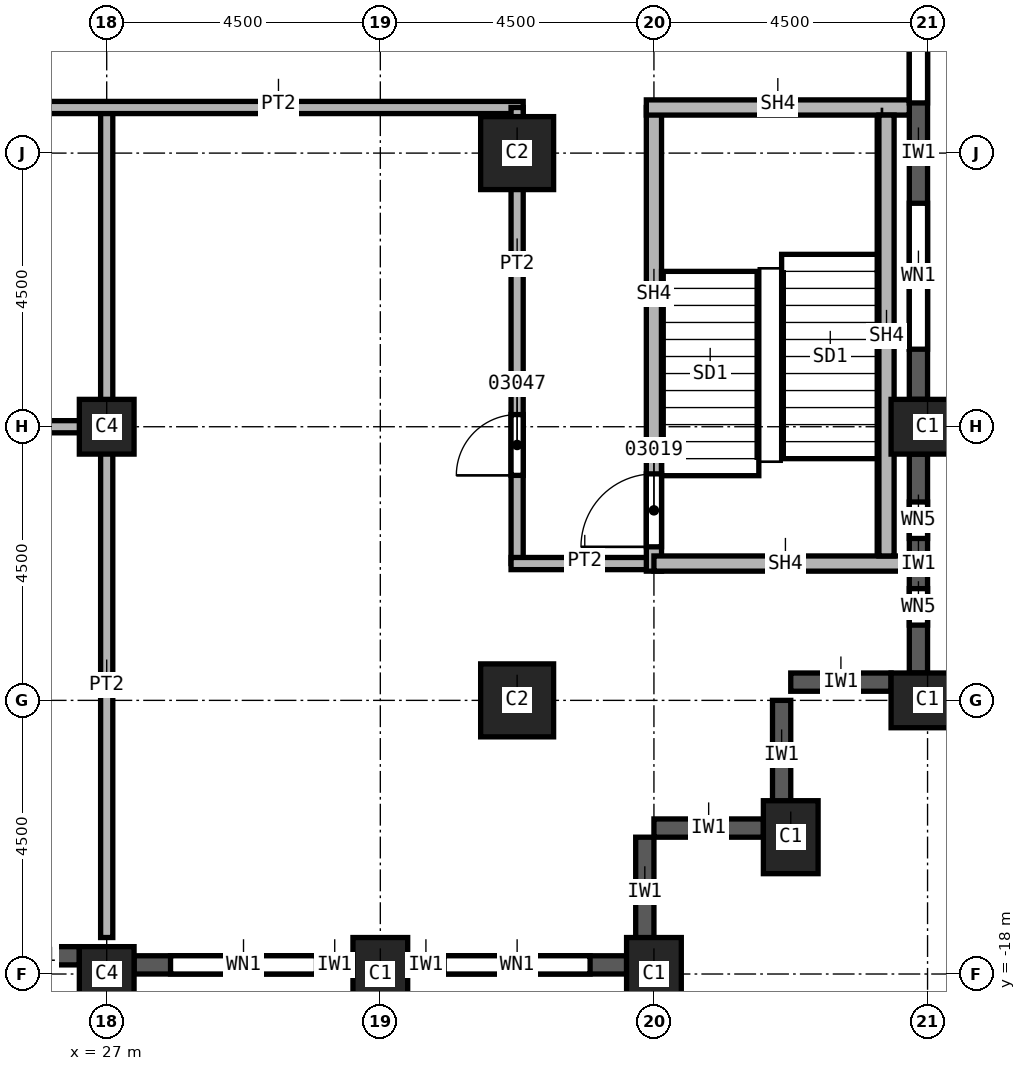
"""IFC4 building model, lengths in metres.
Left out: names, types, materials, properties, quantities, classifications, styles, units other than length and angle.
Written with IfcOpenShell. Run it as: python <this file> out.ifc"""

import sys

from ifc_helpers import new_model, si_unit, direction, frame, frame_2d, origin, origin_2d, place, context, subcontext, project, spatial, rectangle, extrude, element, fill, save


model = new_model("IFC4")
c1 = context("Model", 3, precision=1e-05, world=origin(), true_north=direction((0.0, 1.0)))
c2 = subcontext(c1, "Body", "Model", "MODEL_VIEW")
j1 = project(units=[si_unit("LENGTHUNIT", "METRE"), si_unit("PLANEANGLEUNIT", "RADIAN")], contexts=[c1])
p1 = place(None, origin())
s1 = spatial("IfcSite", under=j1, at=p1, CompositionType="ELEMENT")
p2 = place(p1, origin())
s2 = spatial("IfcBuilding", under=s1, at=p2, CompositionType="ELEMENT")
p3 = place(p2, frame((0.0, 0.0, 92.0)))
s3 = spatial("IfcBuildingStorey", under=s2, at=p3, CompositionType="ELEMENT", Elevation=92.0)
for number, where, z_axis, x_axis in (
    (1, (40.5, -9.0, 0.0), (0.0, 0.0, 1.0), (0.0, 1.0, 0.0)),
    (2, (40.5, -13.5, 0.0), (0.0, 0.0, 1.0), (0.0, 1.0, 0.0)),
    (3, (38.25, -15.75, 0.0), (0.0, 0.0, 1.0), (1.0, 0.0, 0.0)),
    (4, (31.5, -18.0, 0.0), (0.0, 0.0, 1.0), (1.0, 0.0, 0.0)),
    (5, (36.0, -18.0, 0.0), (0.0, 0.0, 1.0), (1.0, 0.0, 0.0)),
):
    element("IfcColumn", number, at=place(p3, frame(where, z_axis=z_axis, x_axis=x_axis)), inside=s3, PredefinedType="COLUMN", context=c2, shape_type="SweptSolid", body=[
        extrude(rectangle(XDim=0.9, YDim=1.2, at=origin_2d()), origin(), (0.0, 0.0, 1.0), 3.7),
    ])
for number, where, z_axis, x_axis in (
    (6, (33.75, -4.5, 0.0), (0.0, 0.0, 1.0), (1.0, 0.0, 0.0)),
    (7, (33.75, -13.5, 0.0), (0.0, 0.0, 1.0), (1.0, 0.0, 0.0)),
):
    element("IfcColumn", number, at=place(p3, frame(where, z_axis=z_axis, x_axis=x_axis)), inside=s3, PredefinedType="COLUMN", context=c2, shape_type="SweptSolid", body=[
        extrude(rectangle(XDim=1.2, YDim=1.2, at=origin_2d()), origin(), (0.0, 0.0, 1.0), 3.7),
    ])
for number, where, z_axis, x_axis in (
    (8, (27.0, -9.0, 0.0), (0.0, 0.0, 1.0), (1.0, 0.0, 0.0)),
    (9, (27.0, -18.0, 0.0), (0.0, 0.0, 1.0), (1.0, 0.0, 0.0)),
):
    element("IfcColumn", number, at=place(p3, frame(where, z_axis=z_axis, x_axis=x_axis)), inside=s3, PredefinedType="COLUMN", context=c2, shape_type="SweptSolid", body=[
        extrude(rectangle(XDim=0.9, YDim=0.9, at=origin_2d()), origin(), (0.0, 0.0, 1.0), 3.7),
    ])
for number, where, z_axis, x_axis in (
    (10, (35.85, -17.55, 0.0), (0.0, 0.0, 1.0), (0.0, 1.0, 0.0)),
    (11, (37.8, -15.6, 0.0), (0.0, 0.0, 1.0), (-1.0, 0.0, 0.0)),
    (12, (38.1, -15.3, 0.0), (0.0, 0.0, 1.0), (0.0, 1.0, 0.0)),
):
    element("IfcWall", number, at=place(p3, frame(where, z_axis=z_axis, x_axis=x_axis)), inside=s3, PredefinedType="SOLIDWALL", context=c2, shape_type="SweptSolid", body=[
        extrude(rectangle(XDim=1.8, YDim=0.3, at=frame_2d((0.9, 0.0))), origin(), (0.0, 0.0, 1.0), 3.1),
    ])
p4 = place(p3, frame((39.9, -13.2, 0.0), z_axis=(0.0, 0.0, 1.0), x_axis=(-1.0, 0.0, 0.0)))
e13 = element("IfcWall", 13, at=p4, inside=s3, PredefinedType="SOLIDWALL", context=c2, shape_type="SweptSolid", body=[
    extrude(rectangle(XDim=1.65, YDim=0.3, at=frame_2d((0.825, 0.0))), origin(), (0.0, 0.0, 1.0), 3.1),
])
p5 = place(p3, frame((25.2, -17.7, 0.0), z_axis=(0.0, 0.0, 1.0), x_axis=(1.0, 0.0, 0.0)))
e14 = element("IfcWall", 14, at=p5, inside=s3, PredefinedType="SOLIDWALL", context=c2, shape_type="SweptSolid", body=[
    extrude(rectangle(XDim=1.35, YDim=0.3, at=frame_2d((0.675, 0.0))), origin(), (0.0, 0.0, 1.0), 3.1),
])
p6 = place(p3, frame((27.45, -17.85, 0.0), z_axis=(0.0, 0.0, 1.0), x_axis=(1.0, 0.0, 0.0)))
e15 = element("IfcWall", 15, at=p6, inside=s3, PredefinedType="SOLIDWALL", context=c2, shape_type="SweptSolid", body=[
    extrude(rectangle(XDim=3.6, YDim=0.3, at=frame_2d((1.8, 0.0))), origin(), (0.0, 0.0, 1.0), 3.1),
])
p7 = place(p6, frame((0.6, 0.0, 0.8)))
e16 = element("IfcOpeningElement", 16, at=p7, cuts=e15, PredefinedType="OPENING", context=c2, shape_type="SweptSolid", body=[
    extrude(rectangle(XDim=2.4, YDim=1.95, at=frame_2d((1.2, 0.975))), frame((0.0, 0.15, 0.0), z_axis=(0.0, -1.0, 0.0), x_axis=(1.0, 0.0, 0.0)), (0.0, 0.0, 1.0), 0.3),
])
p8 = place(p3, frame((31.95, -17.85, 0.0), z_axis=(0.0, 0.0, 1.0), x_axis=(1.0, 0.0, 0.0)))
e17 = element("IfcWall", 17, at=p8, inside=s3, PredefinedType="SOLIDWALL", context=c2, shape_type="SweptSolid", body=[
    extrude(rectangle(XDim=3.6, YDim=0.3, at=frame_2d((1.8, 0.0))), origin(), (0.0, 0.0, 1.0), 3.1),
])
p9 = place(p8, frame((0.6, 0.0, 0.8)))
e18 = element("IfcOpeningElement", 18, at=p9, cuts=e17, PredefinedType="OPENING", context=c2, shape_type="SweptSolid", body=[
    extrude(rectangle(XDim=2.4, YDim=1.95, at=frame_2d((1.2, 0.975))), frame((0.0, 0.15, 0.0), z_axis=(0.0, -1.0, 0.0), x_axis=(1.0, 0.0, 0.0)), (0.0, 0.0, 1.0), 0.3),
])
p10 = place(p3, frame((40.35, -13.05, 0.0), z_axis=(0.0, 0.0, 1.0), x_axis=(0.0, 1.0, 0.0)))
e19 = element("IfcWall", 19, at=p10, inside=s3, PredefinedType="SOLIDWALL", context=c2, shape_type="SweptSolid", body=[
    extrude(rectangle(XDim=3.6, YDim=0.3, at=frame_2d((1.8, 0.0))), origin(), (0.0, 0.0, 1.0), 3.1),
])
p11 = place(p10, frame((0.788, 0.0, 0.8)))
e20 = element("IfcOpeningElement", 20, at=p11, cuts=e19, PredefinedType="OPENING", context=c2, shape_type="SweptSolid", body=[
    extrude(rectangle(XDim=0.6, YDim=1.95, at=frame_2d((0.3, 0.975))), frame((0.0, 0.15, 0.0), z_axis=(0.0, -1.0, 0.0), x_axis=(1.0, 0.0, 0.0)), (0.0, 0.0, 1.0), 0.3),
])
p12 = place(p10, frame((2.212, 0.0, 0.8)))
e21 = element("IfcOpeningElement", 21, at=p12, cuts=e19, PredefinedType="OPENING", context=c2, shape_type="SweptSolid", body=[
    extrude(rectangle(XDim=0.6, YDim=1.95, at=frame_2d((0.3, 0.975))), frame((0.0, 0.15, 0.0), z_axis=(0.0, -1.0, 0.0), x_axis=(1.0, 0.0, 0.0)), (0.0, 0.0, 1.0), 0.3),
])
p13 = place(p3, frame((40.35, -8.55, 0.0), z_axis=(0.0, 0.0, 1.0), x_axis=(0.0, 1.0, 0.0)))
e22 = element("IfcWall", 22, at=p13, inside=s3, PredefinedType="SOLIDWALL", context=c2, shape_type="SweptSolid", body=[
    extrude(rectangle(XDim=8.1, YDim=0.3, at=frame_2d((4.05, 0.0))), origin(), (0.0, 0.0, 1.0), 3.1),
])
p14 = place(p13, frame((0.825, 0.0, 0.8)))
e23 = element("IfcOpeningElement", 23, at=p14, cuts=e22, PredefinedType="OPENING", context=c2, shape_type="SweptSolid", body=[
    extrude(rectangle(XDim=2.4, YDim=1.95, at=frame_2d((1.2, 0.975))), frame((0.0, 0.15, 0.0), z_axis=(0.0, -1.0, 0.0), x_axis=(1.0, 0.0, 0.0)), (0.0, 0.0, 1.0), 0.3),
])
p15 = place(p13, frame((4.875, 0.0, 0.8)))
e24 = element("IfcOpeningElement", 24, at=p15, cuts=e22, PredefinedType="OPENING", context=c2, shape_type="SweptSolid", body=[
    extrude(rectangle(XDim=2.4, YDim=1.95, at=frame_2d((1.2, 0.975))), frame((0.0, 0.15, 0.0), z_axis=(0.0, -1.0, 0.0), x_axis=(1.0, 0.0, 0.0)), (0.0, 0.0, 1.0), 0.3),
])
p16 = place(p3, frame((19.9, -9.0, 0.0), z_axis=(0.0, 0.0, 1.0), x_axis=(1.0, 0.0, 0.0)))
e25 = element("IfcWall", 25, at=p16, inside=s3, PredefinedType="PARTITIONING", context=c2, shape_type="SweptSolid", body=[
    extrude(rectangle(XDim=7.2, YDim=0.2, at=frame_2d((3.6, 0.0))), origin(), (0.0, 0.0, 1.0), 3.7),
])
p17 = place(p3, frame((27.0, -3.75, 0.0), z_axis=(0.0, 0.0, 1.0), x_axis=(0.0, -1.0, 0.0)))
e26 = element("IfcWall", 26, at=p17, inside=s3, PredefinedType="PARTITIONING", context=c2, shape_type="SweptSolid", body=[
    extrude(rectangle(XDim=13.65, YDim=0.2, at=frame_2d((6.825, 0.0))), origin(), (0.0, 0.0, 1.0), 3.7),
])
p18 = place(p3, frame((33.85, -3.75, 0.0), z_axis=(0.0, 0.0, 1.0), x_axis=(-1.0, 0.0, 0.0)))
e27 = element("IfcWall", 27, at=p18, inside=s3, PredefinedType="PARTITIONING", context=c2, shape_type="SweptSolid", body=[
    extrude(rectangle(XDim=13.95, YDim=0.2, at=frame_2d((6.975, 0.0))), origin(), (0.0, 0.0, 1.0), 3.7),
])
p19 = place(p18, frame((8.05, 0.0, 0.0)))
e28 = element("IfcOpeningElement", 28, at=p19, cuts=e27, PredefinedType="OPENING", context=c2, shape_type="SweptSolid", body=[
    extrude(rectangle(XDim=1.0, YDim=2.1, at=frame_2d((0.5, 1.05))), frame((0.0, 0.1, 0.0), z_axis=(0.0, -1.0, 0.0), x_axis=(1.0, 0.0, 0.0)), (0.0, 0.0, 1.0), 0.2),
])
p20 = place(p3, frame((33.75, -11.25, 0.0), z_axis=(0.0, 0.0, 1.0), x_axis=(0.0, 1.0, 0.0)))
e29 = element("IfcWall", 29, at=p20, inside=s3, PredefinedType="PARTITIONING", context=c2, shape_type="SweptSolid", body=[
    extrude(rectangle(XDim=7.5, YDim=0.2, at=frame_2d((3.75, 0.0))), origin(), (0.0, 0.0, 1.0), 3.7),
])
p21 = place(p20, frame((1.45, 0.0, 0.0)))
e30 = element("IfcOpeningElement", 30, at=p21, cuts=e29, PredefinedType="OPENING", context=c2, shape_type="SweptSolid", body=[
    extrude(rectangle(XDim=1.0, YDim=2.1, at=frame_2d((0.5, 1.05))), frame((0.0, 0.1, 0.0), z_axis=(0.0, -1.0, 0.0), x_axis=(1.0, 0.0, 0.0)), (0.0, 0.0, 1.0), 0.2),
])
p22 = place(p3, frame((36.0, -11.25, 0.0), z_axis=(0.0, 0.0, 1.0), x_axis=(-1.0, 0.0, 0.0)))
e31 = element("IfcWall", 31, at=p22, inside=s3, PredefinedType="PARTITIONING", context=c2, shape_type="SweptSolid", body=[
    extrude(rectangle(XDim=2.35, YDim=0.2, at=frame_2d((1.175, 0.0))), origin(), (0.0, 0.0, 1.0), 3.7),
])
p23 = place(p3, frame((36.0, -11.375, 0.0), z_axis=(0.0, 0.0, 1.0), x_axis=(0.0, 1.0, 0.0)))
e32 = element("IfcWall", 32, at=p23, inside=s3, PredefinedType="SOLIDWALL", context=c2, shape_type="SweptSolid", body=[
    extrude(rectangle(XDim=7.625, YDim=0.25, at=frame_2d((3.812, 0.0))), origin(), (0.0, 0.0, 1.0), 3.7),
])
p24 = place(p23, frame((0.4, 0.0, 0.0)))
e33 = element("IfcOpeningElement", 33, at=p24, cuts=e32, PredefinedType="OPENING", context=c2, shape_type="SweptSolid", body=[
    extrude(rectangle(XDim=1.2, YDim=2.1, at=frame_2d((0.6, 1.05))), frame((0.0, 0.125, 0.0), z_axis=(0.0, -1.0, 0.0), x_axis=(1.0, 0.0, 0.0)), (0.0, 0.0, 1.0), 0.25),
])
p25 = place(p3, frame((40.2, -11.25, 0.0), z_axis=(0.0, 0.0, 1.0), x_axis=(-1.0, 0.0, 0.0)))
e34 = element("IfcWall", 34, at=p25, inside=s3, PredefinedType="SOLIDWALL", context=c2, shape_type="SweptSolid", body=[
    extrude(rectangle(XDim=4.2, YDim=0.25, at=frame_2d((2.1, 0.0))), origin(), (0.0, 0.0, 1.0), 3.7),
])
p26 = place(p3, frame((40.2, -3.75, 0.0), z_axis=(0.0, 0.0, 1.0), x_axis=(-1.0, 0.0, 0.0)))
e35 = element("IfcWall", 35, at=p26, inside=s3, PredefinedType="SOLIDWALL", context=c2, shape_type="SweptSolid", body=[
    extrude(rectangle(XDim=4.325, YDim=0.25, at=frame_2d((2.163, 0.0))), origin(), (0.0, 0.0, 1.0), 3.7),
])
p27 = place(p3, frame((39.825, -11.125, 0.0), z_axis=(0.0, 0.0, 1.0), x_axis=(0.0, 1.0, 0.0)))
e36 = element("IfcWall", 36, at=p27, inside=s3, PredefinedType="SOLIDWALL", context=c2, shape_type="SweptSolid", body=[
    extrude(rectangle(XDim=7.25, YDim=0.25, at=frame_2d((3.625, 0.0))), origin(), (0.0, 0.0, 1.0), 3.7),
])
p28 = place(p7, origin())
e37 = element("IfcWindow", 37, at=p28, inside=s3, PartitioningType="SINGLE_PANEL", PredefinedType="WINDOW", context=c2, shape_type="SweptSolid", body=[
    extrude(rectangle(XDim=2.4, YDim=1.95, at=frame_2d((1.2, 0.975))), frame((0.0, 0.03, 0.0), z_axis=(0.0, -1.0, 0.0), x_axis=(1.0, 0.0, 0.0)), (0.0, 0.0, 1.0), 0.06),
])
fill(e16, e37)
p29 = place(p9, origin())
e38 = element("IfcWindow", 38, at=p29, inside=s3, PartitioningType="SINGLE_PANEL", PredefinedType="WINDOW", context=c2, shape_type="SweptSolid", body=[
    extrude(rectangle(XDim=2.4, YDim=1.95, at=frame_2d((1.2, 0.975))), frame((0.0, 0.03, 0.0), z_axis=(0.0, -1.0, 0.0), x_axis=(1.0, 0.0, 0.0)), (0.0, 0.0, 1.0), 0.06),
])
fill(e18, e38)
p30 = place(p14, origin())
e39 = element("IfcWindow", 39, at=p30, inside=s3, PartitioningType="SINGLE_PANEL", PredefinedType="WINDOW", context=c2, shape_type="SweptSolid", body=[
    extrude(rectangle(XDim=2.4, YDim=1.95, at=frame_2d((1.2, 0.975))), frame((0.0, 0.03, 0.0), z_axis=(0.0, -1.0, 0.0), x_axis=(1.0, 0.0, 0.0)), (0.0, 0.0, 1.0), 0.06),
])
fill(e23, e39)
p31 = place(p15, origin())
e40 = element("IfcWindow", 40, at=p31, inside=s3, PartitioningType="SINGLE_PANEL", PredefinedType="WINDOW", context=c2, shape_type="SweptSolid", body=[
    extrude(rectangle(XDim=2.4, YDim=1.95, at=frame_2d((1.2, 0.975))), frame((0.0, 0.03, 0.0), z_axis=(0.0, -1.0, 0.0), x_axis=(1.0, 0.0, 0.0)), (0.0, 0.0, 1.0), 0.06),
])
fill(e24, e40)
p32 = place(p24, origin())
e41 = element("IfcDoor", 41, at=p32, inside=s3, OperationType="SINGLE_SWING_RIGHT", PredefinedType="DOOR", context=c2, shape_type="SweptSolid", body=[
    extrude(rectangle(XDim=1.2, YDim=2.1, at=frame_2d((0.6, 1.05))), frame((0.0, 0.025, 0.0), z_axis=(0.0, -1.0, 0.0), x_axis=(1.0, 0.0, 0.0)), (0.0, 0.0, 1.0), 0.05),
])
fill(e33, e41)
p33 = place(p21, origin())
e42 = element("IfcDoor", 42, at=p33, inside=s3, OperationType="SINGLE_SWING_RIGHT", PredefinedType="DOOR", context=c2, shape_type="SweptSolid", body=[
    extrude(rectangle(XDim=1.0, YDim=2.1, at=frame_2d((0.5, 1.05))), frame((0.0, 0.025, 0.0), z_axis=(0.0, -1.0, 0.0), x_axis=(1.0, 0.0, 0.0)), (0.0, 0.0, 1.0), 0.05),
])
fill(e30, e42)
p34 = place(p11, origin())
e43 = element("IfcWindow", 43, at=p34, inside=s3, PartitioningType="SINGLE_PANEL", PredefinedType="WINDOW", context=c2, shape_type="SweptSolid", body=[
    extrude(rectangle(XDim=0.6, YDim=1.95, at=frame_2d((0.3, 0.975))), frame((0.0, 0.03, 0.0), z_axis=(0.0, -1.0, 0.0), x_axis=(1.0, 0.0, 0.0)), (0.0, 0.0, 1.0), 0.06),
])
fill(e20, e43)
p35 = place(p12, origin())
e44 = element("IfcWindow", 44, at=p35, inside=s3, PartitioningType="SINGLE_PANEL", PredefinedType="WINDOW", context=c2, shape_type="SweptSolid", body=[
    extrude(rectangle(XDim=0.6, YDim=1.95, at=frame_2d((0.3, 0.975))), frame((0.0, 0.03, 0.0), z_axis=(0.0, -1.0, 0.0), x_axis=(1.0, 0.0, 0.0)), (0.0, 0.0, 1.0), 0.06),
])
fill(e21, e44)
save(model, sys.argv[1])
